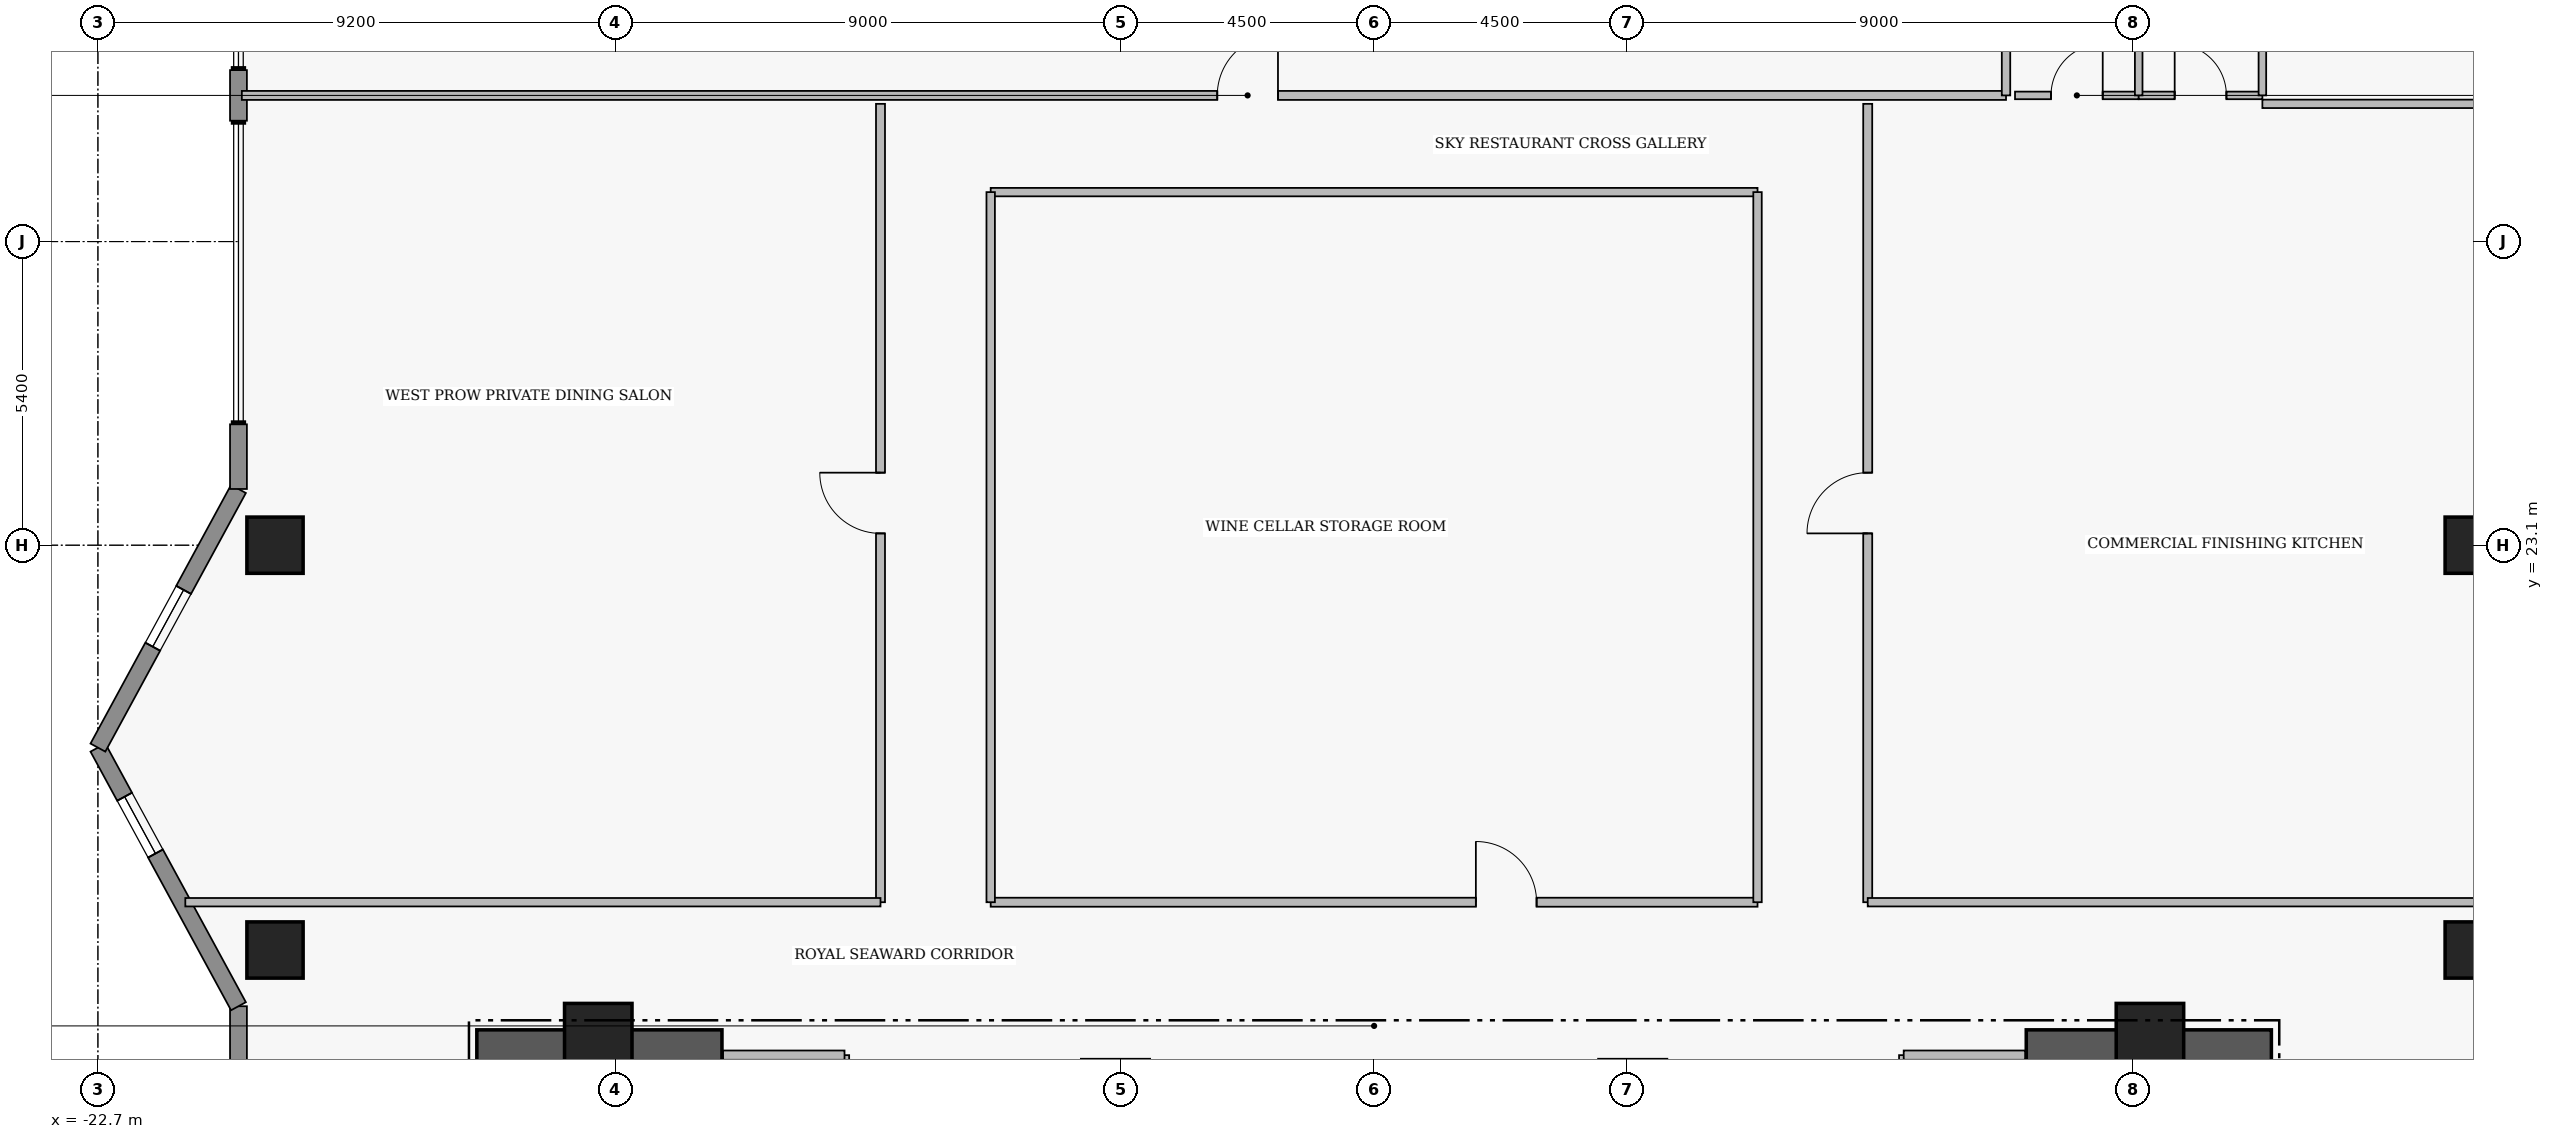
"""IFC4 building model, lengths in metres.
Left out: names, types, materials, properties, quantities, classifications, styles, units other than length and angle.
Written with IfcOpenShell. Run it as: python <this file> out.ifc"""

import sys

from ifc_helpers import new_model, si_unit, direction, frame, frame_2d, origin, origin_2d, place, context, subcontext, project, spatial, rectangle, extrude, element, fill, save


model = new_model("IFC4")
c1 = context("Model", 3, precision=1e-05, world=origin(), true_north=direction((0.0, 1.0)))
c2 = subcontext(c1, "Body", "Model", "MODEL_VIEW")
j1 = project(units=[si_unit("LENGTHUNIT", "METRE"), si_unit("PLANEANGLEUNIT", "RADIAN")], contexts=[c1])
p1 = place(None, origin())
s1 = spatial("IfcSite", under=j1, at=p1, CompositionType="ELEMENT")
p2 = place(p1, origin())
s2 = spatial("IfcBuilding", under=s1, at=p2, CompositionType="ELEMENT")
p3 = place(p2, frame((0.0, 0.0, 284.05)))
s3 = spatial("IfcBuildingStorey", under=s2, at=p3, CompositionType="ELEMENT", Elevation=284.05)
for number, where, z_axis, x_axis in (
    (1, (-15.96, 14.205, 0.0), (0.0, 0.0, 1.0), (1.0, 0.0, 0.0)),
    (2, (11.6, 14.205, 0.0), (0.0, 0.0, 1.0), (1.0, 0.0, 0.0)),
):
    element("IfcWall", number, at=place(p3, frame(where, z_axis=z_axis, x_axis=x_axis)), inside=s3, PredefinedType="SHEAR", context=c2, shape_type="SweptSolid", body=[
        extrude(rectangle(XDim=4.36, YDim=0.55, at=frame_2d((2.18, 0.0))), origin(), (0.0, 0.0, 1.0), 4.21),
    ])
for number, where, z_axis, x_axis in (
    (3, (-13.8, 14.35, 0.0), (0.0, 0.0, 1.0), (1.0, 0.0, 0.0)),
    (4, (-4.6, 13.35, 0.0), (0.0, 0.0, 1.0), (1.0, 0.0, 0.0)),
    (5, (4.6, 13.35, 0.0), (0.0, 0.0, 1.0), (1.0, 0.0, 0.0)),
    (6, (13.8, 14.35, 0.0), (0.0, 0.0, 1.0), (1.0, 0.0, 0.0)),
):
    element("IfcColumn", number, at=place(p3, frame(where, z_axis=z_axis, x_axis=x_axis)), inside=s3, PredefinedType="COLUMN", context=c2, shape_type="SweptSolid", body=[
        extrude(rectangle(XDim=1.2, YDim=1.2, at=origin_2d()), origin(), (0.0, 0.0, 1.0), 4.4),
    ])
for number, where, z_axis, x_axis in (
    (7, (-19.55, 15.9, 0.0), (0.0, 0.0, 1.0), (1.0, 0.0, 0.0)),
    (8, (-19.55, 23.1, 0.0), (0.0, 0.0, 1.0), (1.0, 0.0, 0.0)),
    (9, (19.55, 15.9, 0.0), (0.0, 0.0, 1.0), (1.0, 0.0, 0.0)),
    (10, (19.55, 23.1, 0.0), (0.0, 0.0, 1.0), (1.0, 0.0, 0.0)),
):
    element("IfcColumn", number, at=place(p3, frame(where, z_axis=z_axis, x_axis=x_axis)), inside=s3, PredefinedType="COLUMN", context=c2, shape_type="SweptSolid", body=[
        extrude(rectangle(XDim=1.0, YDim=1.0, at=origin_2d()), origin(), (0.0, 0.0, 1.0), 4.4),
    ])
p4 = place(p3, frame((-20.2, 13.75, 0.0), z_axis=(0.0, 0.0, 1.0), x_axis=(0.0, 1.0, 0.0)))
e11 = element("IfcWall", 11, at=p4, inside=s3, PredefinedType="STANDARD", context=c2, shape_type="SweptSolid", body=[
    extrude(rectangle(XDim=1.15, YDim=0.3, at=frame_2d((0.575, 0.0))), origin(), (0.0, 0.0, 1.0), 4.18),
])
p5 = place(p3, frame((-20.2, 14.9, 0.0), z_axis=(0.0, 0.0, 1.0), x_axis=(-0.477505494629, 0.878628762675, 0.0)))
e12 = element("IfcWall", 12, at=p5, inside=s3, PredefinedType="STANDARD", context=c2, shape_type="SweptSolid", body=[
    extrude(rectangle(XDim=5.236, YDim=0.3, at=frame_2d((2.618, 0.0))), origin(), (0.0, 0.0, 1.0), 4.18),
])
p6 = place(p5, frame((3.091, 0.0, 1.25)))
e13 = element("IfcOpeningElement", 13, at=p6, cuts=e12, PredefinedType="OPENING", context=c2, shape_type="SweptSolid", body=[
    extrude(rectangle(XDim=1.15, YDim=1.55, at=frame_2d((0.575, 0.775))), frame((0.0, 0.16, 0.0), z_axis=(0.0, -1.0, 0.0), x_axis=(1.0, 0.0, 0.0)), (0.0, 0.0, 1.0), 0.32),
])
p7 = place(p3, frame((-22.7, 19.5, 0.0), z_axis=(0.0, 0.0, 1.0), x_axis=(0.477505494629, 0.878628762675, 0.0)))
e14 = element("IfcWall", 14, at=p7, inside=s3, PredefinedType="STANDARD", context=c2, shape_type="SweptSolid", body=[
    extrude(rectangle(XDim=5.236, YDim=0.3, at=frame_2d((2.618, 0.0))), origin(), (0.0, 0.0, 1.0), 4.18),
])
p8 = place(p7, frame((2.043, 0.0, 1.25)))
e15 = element("IfcOpeningElement", 15, at=p8, cuts=e14, PredefinedType="OPENING", context=c2, shape_type="SweptSolid", body=[
    extrude(rectangle(XDim=1.15, YDim=1.55, at=frame_2d((0.575, 0.775))), frame((0.0, 0.16, 0.0), z_axis=(0.0, -1.0, 0.0), x_axis=(1.0, 0.0, 0.0)), (0.0, 0.0, 1.0), 0.32),
])
p9 = place(p3, frame((-20.2, 24.1, 0.0), z_axis=(0.0, 0.0, 1.0), x_axis=(0.0, 1.0, 0.0)))
e16 = element("IfcWall", 16, at=p9, inside=s3, PredefinedType="STANDARD", context=c2, shape_type="SweptSolid", body=[
    extrude(rectangle(XDim=1.15, YDim=0.3, at=frame_2d((0.575, 0.0))), origin(), (0.0, 0.0, 1.0), 4.18),
])
p10 = place(p3, frame((-20.2, 30.65, 0.0), z_axis=(0.0, 0.0, 1.0), x_axis=(0.0, 1.0, 0.0)))
e17 = element("IfcWall", 17, at=p10, inside=s3, PredefinedType="STANDARD", context=c2, shape_type="SweptSolid", body=[
    extrude(rectangle(XDim=0.9, YDim=0.3, at=frame_2d((0.45, 0.0))), origin(), (0.0, 0.0, 1.0), 4.18),
])
p11 = place(p3, frame((-20.14, 31.1, 0.0), z_axis=(0.0, 0.0, 1.0), x_axis=(1.0, 0.0, 0.0)))
e18 = element("IfcWall", 18, at=p11, inside=s3, PredefinedType="PARTITIONING", context=c2, shape_type="SweptSolid", body=[
    extrude(rectangle(XDim=31.38, YDim=0.16, at=frame_2d((15.69, 0.0))), origin(), (0.0, 0.0, 1.0), 4.18),
])
p12 = place(p11, frame((17.35, 0.0, 0.0)))
e19 = element("IfcOpeningElement", 19, at=p12, cuts=e18, PredefinedType="OPENING", context=c2, shape_type="SweptSolid", body=[
    extrude(rectangle(XDim=1.08, YDim=2.18, at=frame_2d((0.54, 1.09))), frame((0.0, 0.09, 0.0), z_axis=(0.0, -1.0, 0.0), x_axis=(1.0, 0.0, 0.0)), (0.0, 0.0, 1.0), 0.18),
])
p13 = place(p3, frame((-6.82, 16.75, 0.0), z_axis=(0.0, 0.0, 1.0), x_axis=(1.0, 0.0, 0.0)))
e20 = element("IfcWall", 20, at=p13, inside=s3, PredefinedType="PARTITIONING", context=c2, shape_type="SweptSolid", body=[
    extrude(rectangle(XDim=13.64, YDim=0.16, at=frame_2d((6.82, 0.0))), origin(), (0.0, 0.0, 1.0), 3.776),
])
p14 = place(p13, frame((8.63, 0.0, 0.0)))
e21 = element("IfcOpeningElement", 21, at=p14, cuts=e20, PredefinedType="OPENING", context=c2, shape_type="SweptSolid", body=[
    extrude(rectangle(XDim=1.08, YDim=2.18, at=frame_2d((0.54, 1.09))), frame((0.0, 0.09, 0.0), z_axis=(0.0, -1.0, 0.0), x_axis=(1.0, 0.0, 0.0)), (0.0, 0.0, 1.0), 0.18),
])
p15 = place(p3, frame((-8.78, 16.75, 0.0), z_axis=(0.0, 0.0, 1.0), x_axis=(0.0, 1.0, 0.0)))
e22 = element("IfcWall", 22, at=p15, inside=s3, PredefinedType="PARTITIONING", context=c2, shape_type="SweptSolid", body=[
    extrude(rectangle(XDim=14.2, YDim=0.16, at=frame_2d((7.1, 0.0))), origin(), (0.0, 0.0, 1.0), 4.18),
])
p16 = place(p15, frame((6.56, 0.0, 0.0)))
e23 = element("IfcOpeningElement", 23, at=p16, cuts=e22, PredefinedType="OPENING", context=c2, shape_type="SweptSolid", body=[
    extrude(rectangle(XDim=1.08, YDim=2.18, at=frame_2d((0.54, 1.09))), frame((0.0, 0.09, 0.0), z_axis=(0.0, -1.0, 0.0), x_axis=(1.0, 0.0, 0.0)), (0.0, 0.0, 1.0), 0.18),
])
p17 = place(p3, frame((8.78, 16.75, 0.0), z_axis=(0.0, 0.0, 1.0), x_axis=(0.0, 1.0, 0.0)))
e24 = element("IfcWall", 24, at=p17, inside=s3, PredefinedType="PARTITIONING", context=c2, shape_type="SweptSolid", body=[
    extrude(rectangle(XDim=14.2, YDim=0.16, at=frame_2d((7.1, 0.0))), origin(), (0.0, 0.0, 1.0), 4.18),
])
p18 = place(p17, frame((6.56, 0.0, 0.0)))
e25 = element("IfcOpeningElement", 25, at=p18, cuts=e24, PredefinedType="OPENING", context=c2, shape_type="SweptSolid", body=[
    extrude(rectangle(XDim=1.08, YDim=2.18, at=frame_2d((0.54, 1.09))), frame((0.0, 0.09, 0.0), z_axis=(0.0, -1.0, 0.0), x_axis=(1.0, 0.0, 0.0)), (0.0, 0.0, 1.0), 0.18),
])
p19 = place(p3, frame((11.4, 31.1, 0.0), z_axis=(0.0, 0.0, 1.0), x_axis=(1.0, 0.0, 0.0)))
e26 = element("IfcWall", 26, at=p19, inside=s3, PredefinedType="PLUMBINGWALL", context=c2, shape_type="SweptSolid", body=[
    extrude(rectangle(XDim=2.2, YDim=0.135, at=frame_2d((1.1, 0.0))), origin(), (0.0, 0.0, 1.0), 4.18),
])
p20 = place(p19, frame((0.64, 0.0, 0.0)))
e27 = element("IfcOpeningElement", 27, at=p20, cuts=e26, PredefinedType="OPENING", context=c2, shape_type="SweptSolid", body=[
    extrude(rectangle(XDim=0.92, YDim=2.12, at=frame_2d((0.46, 1.06))), frame((0.0, 0.077, 0.0), z_axis=(0.0, -1.0, 0.0), x_axis=(1.0, 0.0, 0.0)), (0.0, 0.0, 1.0), 0.155),
])
p21 = place(p3, frame((13.6, 31.1, 0.0), z_axis=(0.0, 0.0, 1.0), x_axis=(1.0, 0.0, 0.0)))
e28 = element("IfcWall", 28, at=p21, inside=s3, PredefinedType="PLUMBINGWALL", context=c2, shape_type="SweptSolid", body=[
    extrude(rectangle(XDim=2.2, YDim=0.135, at=frame_2d((1.1, 0.0))), origin(), (0.0, 0.0, 1.0), 4.18),
])
p22 = place(p21, frame((0.64, 0.0, 0.0)))
e29 = element("IfcOpeningElement", 29, at=p22, cuts=e28, PredefinedType="OPENING", context=c2, shape_type="SweptSolid", body=[
    extrude(rectangle(XDim=0.92, YDim=2.12, at=frame_2d((0.46, 1.06))), frame((0.0, 0.077, 0.0), z_axis=(0.0, -1.0, 0.0), x_axis=(1.0, 0.0, 0.0)), (0.0, 0.0, 1.0), 0.155),
])
p23 = place(p3, frame((-9.42, 11.07, 0.0), z_axis=(0.0, 0.0, 1.0), x_axis=(0.0, 1.0, 0.0)))
e30 = element("IfcWall", 30, at=p23, inside=s3, PredefinedType="PARTITIONING", context=c2, shape_type="SweptSolid", body=[
    extrude(rectangle(XDim=2.96, YDim=0.165, at=frame_2d((1.48, 0.0))), origin(), (0.0, 0.0, 1.0), 4.18),
])
p24 = place(p3, frame((-11.58, 14.03, 0.0), z_axis=(0.0, 0.0, 1.0), x_axis=(1.0, 0.0, 0.0)))
e31 = element("IfcWall", 31, at=p24, inside=s3, PredefinedType="PARTITIONING", context=c2, shape_type="SweptSolid", body=[
    extrude(rectangle(XDim=2.16, YDim=0.165, at=frame_2d((1.08, 0.0))), origin(), (0.0, 0.0, 1.0), 4.18),
])
p25 = place(p3, frame((9.42, 11.07, 0.0), z_axis=(0.0, 0.0, 1.0), x_axis=(0.0, 1.0, 0.0)))
e32 = element("IfcWall", 32, at=p25, inside=s3, PredefinedType="PARTITIONING", context=c2, shape_type="SweptSolid", body=[
    extrude(rectangle(XDim=2.96, YDim=0.165, at=frame_2d((1.48, 0.0))), origin(), (0.0, 0.0, 1.0), 4.18),
])
p26 = place(p3, frame((9.42, 14.03, 0.0), z_axis=(0.0, 0.0, 1.0), x_axis=(1.0, 0.0, 0.0)))
e33 = element("IfcWall", 33, at=p26, inside=s3, PredefinedType="PARTITIONING", context=c2, shape_type="SweptSolid", body=[
    extrude(rectangle(XDim=2.16, YDim=0.165, at=frame_2d((1.08, 0.0))), origin(), (0.0, 0.0, 1.0), 4.18),
])
p27 = place(p3, frame((11.24, 31.1, 0.0), z_axis=(0.0, 0.0, 1.0), x_axis=(0.0, 1.0, 0.0)))
e34 = element("IfcWall", 34, at=p27, inside=s3, PredefinedType="PARTITIONING", context=c2, shape_type="SweptSolid", body=[
    extrude(rectangle(XDim=7.84, YDim=0.15, at=frame_2d((3.92, 0.0))), origin(), (0.0, 0.0, 1.0), 4.18),
])
p28 = place(p3, frame((-6.82, 29.38, 0.0), z_axis=(0.0, 0.0, 1.0), x_axis=(1.0, 0.0, 0.0)))
e35 = element("IfcWall", 35, at=p28, inside=s3, PredefinedType="PARTITIONING", context=c2, shape_type="SweptSolid", body=[
    extrude(rectangle(XDim=13.64, YDim=0.15, at=frame_2d((6.82, 0.0))), origin(), (0.0, 0.0, 1.0), 4.18),
])
for number, where, z_axis, x_axis in (
    (36, (-6.82, 16.75, 0.0), (0.0, 0.0, 1.0), (0.0, 1.0, 0.0)),
    (37, (6.82, 16.75, 0.0), (0.0, 0.0, 1.0), (0.0, 1.0, 0.0)),
):
    element("IfcWall", number, at=place(p3, frame(where, z_axis=z_axis, x_axis=x_axis)), inside=s3, PredefinedType="PARTITIONING", context=c2, shape_type="SweptSolid", body=[
        extrude(rectangle(XDim=12.63, YDim=0.15, at=frame_2d((6.315, 0.0))), origin(), (0.0, 0.0, 1.0), 4.18),
    ])
for number, where, z_axis, x_axis in (
    (38, (-21.146, 16.75, 0.0), (0.0, 0.0, 1.0), (1.0, 0.0, 0.0)),
    (39, (8.78, 16.75, 0.0), (0.0, 0.0, 1.0), (1.0, 0.0, 0.0)),
):
    element("IfcWall", number, at=place(p3, frame(where, z_axis=z_axis, x_axis=x_axis)), inside=s3, PredefinedType="PARTITIONING", context=c2, shape_type="SweptSolid", body=[
        extrude(rectangle(XDim=12.365, YDim=0.15, at=frame_2d((6.183, 0.0))), origin(), (0.0, 0.0, 1.0), 3.776),
    ])
p29 = place(p3, frame((15.8, 30.95, 0.0), z_axis=(0.0, 0.0, 1.0), x_axis=(1.0, 0.0, 0.0)))
e40 = element("IfcWall", 40, at=p29, inside=s3, PredefinedType="PARTITIONING", context=c2, shape_type="SweptSolid", body=[
    extrude(rectangle(XDim=4.34, YDim=0.15, at=frame_2d((2.17, 0.0))), origin(), (0.0, 0.0, 1.0), 4.18),
])
p30 = place(p3, frame((15.8, 31.1, 0.0), z_axis=(0.0, 0.0, 1.0), x_axis=(0.0, 1.0, 0.0)))
e41 = element("IfcWall", 41, at=p30, inside=s3, PredefinedType="PLUMBINGWALL", context=c2, shape_type="SweptSolid", body=[
    extrude(rectangle(XDim=4.4, YDim=0.135, at=frame_2d((2.2, 0.0))), origin(), (0.0, 0.0, 1.0), 4.18),
])
p31 = place(p3, frame((13.6, 31.1, 0.0), z_axis=(0.0, 0.0, 1.0), x_axis=(0.0, 1.0, 0.0)))
e42 = element("IfcWall", 42, at=p31, inside=s3, PredefinedType="PLUMBINGWALL", context=c2, shape_type="SweptSolid", body=[
    extrude(rectangle(XDim=4.4, YDim=0.135, at=frame_2d((2.2, 0.0))), origin(), (0.0, 0.0, 1.0), 3.062),
])
p32 = place(p6, origin())
e43 = element("IfcWindow", 43, at=p32, inside=s3, PartitioningType="SINGLE_PANEL", PredefinedType="WINDOW", context=c2, shape_type="SweptSolid", body=[
    extrude(rectangle(XDim=1.15, YDim=1.55, at=frame_2d((0.575, 0.775))), frame((0.0, 0.03, 0.0), z_axis=(0.0, -1.0, 0.0), x_axis=(1.0, 0.0, 0.0)), (0.0, 0.0, 1.0), 0.06),
])
fill(e13, e43)
p33 = place(p8, origin())
e44 = element("IfcWindow", 44, at=p33, inside=s3, PartitioningType="SINGLE_PANEL", PredefinedType="WINDOW", context=c2, shape_type="SweptSolid", body=[
    extrude(rectangle(XDim=1.15, YDim=1.55, at=frame_2d((0.575, 0.775))), frame((0.0, 0.03, 0.0), z_axis=(0.0, -1.0, 0.0), x_axis=(1.0, 0.0, 0.0)), (0.0, 0.0, 1.0), 0.06),
])
fill(e15, e44)
p34 = place(p12, origin())
e45 = element("IfcDoor", 45, at=p34, inside=s3, OperationType="SINGLE_SWING_RIGHT", PredefinedType="DOOR", context=c2, shape_type="SweptSolid", body=[
    extrude(rectangle(XDim=1.08, YDim=2.18, at=frame_2d((0.54, 1.09))), frame((0.0, 0.025, 0.0), z_axis=(0.0, -1.0, 0.0), x_axis=(1.0, 0.0, 0.0)), (0.0, 0.0, 1.0), 0.05),
])
fill(e19, e45)
p35 = place(p14, origin())
e46 = element("IfcDoor", 46, at=p35, inside=s3, OperationType="SINGLE_SWING_LEFT", PredefinedType="DOOR", context=c2, shape_type="SweptSolid", body=[
    extrude(rectangle(XDim=1.08, YDim=2.18, at=frame_2d((0.54, 1.09))), frame((0.0, 0.025, 0.0), z_axis=(0.0, -1.0, 0.0), x_axis=(1.0, 0.0, 0.0)), (0.0, 0.0, 1.0), 0.05),
])
fill(e21, e46)
p36 = place(p16, origin())
e47 = element("IfcDoor", 47, at=p36, inside=s3, OperationType="SINGLE_SWING_RIGHT", PredefinedType="DOOR", context=c2, shape_type="SweptSolid", body=[
    extrude(rectangle(XDim=1.08, YDim=2.18, at=frame_2d((0.54, 1.09))), frame((0.0, 0.025, 0.0), z_axis=(0.0, -1.0, 0.0), x_axis=(1.0, 0.0, 0.0)), (0.0, 0.0, 1.0), 0.05),
])
fill(e23, e47)
p37 = place(p18, origin())
e48 = element("IfcDoor", 48, at=p37, inside=s3, OperationType="SINGLE_SWING_LEFT", PredefinedType="DOOR", context=c2, shape_type="SweptSolid", body=[
    extrude(rectangle(XDim=1.08, YDim=2.18, at=frame_2d((0.54, 1.09))), frame((0.0, 0.025, 0.0), z_axis=(0.0, -1.0, 0.0), x_axis=(1.0, 0.0, 0.0)), (0.0, 0.0, 1.0), 0.05),
])
fill(e25, e48)
p38 = place(p20, origin())
e49 = element("IfcDoor", 49, at=p38, inside=s3, OperationType="SINGLE_SWING_RIGHT", PredefinedType="DOOR", context=c2, shape_type="SweptSolid", body=[
    extrude(rectangle(XDim=0.92, YDim=2.12, at=frame_2d((0.46, 1.06))), frame((0.0, 0.025, 0.0), z_axis=(0.0, -1.0, 0.0), x_axis=(1.0, 0.0, 0.0)), (0.0, 0.0, 1.0), 0.05),
])
fill(e27, e49)
p39 = place(p22, origin())
e50 = element("IfcDoor", 50, at=p39, inside=s3, OperationType="SINGLE_SWING_LEFT", PredefinedType="DOOR", context=c2, shape_type="SweptSolid", body=[
    extrude(rectangle(XDim=0.92, YDim=2.12, at=frame_2d((0.46, 1.06))), frame((0.0, 0.025, 0.0), z_axis=(0.0, -1.0, 0.0), x_axis=(1.0, 0.0, 0.0)), (0.0, 0.0, 1.0), 0.05),
])
fill(e29, e50)
save(model, sys.argv[1])
